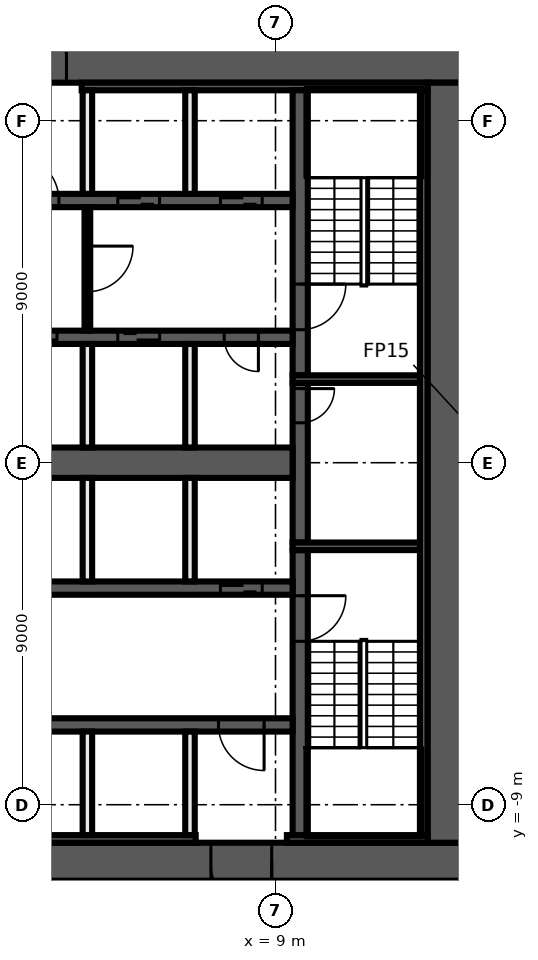
"""IFC4 building model, lengths in metres.
Left out: names, types, materials, properties, quantities, classifications, styles, units other than length and angle.
Written with IfcOpenShell. Run it as: python <this file> out.ifc"""

import sys

from ifc_helpers import new_model, si_unit, direction, frame, frame_2d, origin, place, context, subcontext, project, spatial, rectangle, extrude, element, fill, save


model = new_model("IFC4")
c1 = context("Model", 3, precision=1e-05, world=origin(), true_north=direction((0.0, 1.0)))
c2 = subcontext(c1, "Body", "Model", "MODEL_VIEW")
j1 = project(units=[si_unit("LENGTHUNIT", "METRE"), si_unit("PLANEANGLEUNIT", "RADIAN")], contexts=[c1])
p1 = place(None, origin())
s1 = spatial("IfcSite", under=j1, at=p1, CompositionType="ELEMENT")
p2 = place(p1, origin())
s2 = spatial("IfcBuilding", under=s1, at=p2, CompositionType="ELEMENT")
p3 = place(p2, frame((0.0, 0.0, 128.5)))
s3 = spatial("IfcBuildingStorey", under=s2, at=p3, CompositionType="ELEMENT", Elevation=128.5)
p4 = place(p3, frame((-14.0, 10.5, 0.0), z_axis=(0.0, 0.0, 1.0), x_axis=(1.0, 0.0, 0.0)))
e1 = element("IfcWall", 1, at=p4, inside=s3, PredefinedType="SHEAR", context=c2, shape_type="SweptSolid", body=[
    extrude(rectangle(XDim=28.0, YDim=1.0, at=frame_2d((14.0, 0.0))), origin(), (0.0, 0.0, 1.0), 3.3),
])
p5 = place(p4, frame((15.9, 0.0, 0.0)))
e2 = element("IfcOpeningElement", 2, at=p5, cuts=e1, PredefinedType="OPENING", context=c2, shape_type="SweptSolid", body=[
    extrude(rectangle(XDim=1.6, YDim=2.1, at=frame_2d((0.8, 1.05))), frame((0.0, 0.51, 0.0), z_axis=(0.0, -1.0, 0.0), x_axis=(1.0, 0.0, 0.0)), (0.0, 0.0, 1.0), 1.02),
])
p6 = place(p3, frame((14.0, -10.5, 0.0), z_axis=(0.0, 0.0, 1.0), x_axis=(-1.0, 0.0, 0.0)))
e3 = element("IfcWall", 3, at=p6, inside=s3, PredefinedType="SHEAR", context=c2, shape_type="SweptSolid", body=[
    extrude(rectangle(XDim=28.0, YDim=1.0, at=frame_2d((14.0, 0.0))), origin(), (0.0, 0.0, 1.0), 3.3),
])
p7 = place(p6, frame((5.1, 0.0, 0.0)))
e4 = element("IfcOpeningElement", 4, at=p7, cuts=e3, PredefinedType="OPENING", context=c2, shape_type="SweptSolid", body=[
    extrude(rectangle(XDim=1.6, YDim=2.1, at=frame_2d((0.8, 1.05))), frame((0.0, 0.51, 0.0), z_axis=(0.0, -1.0, 0.0), x_axis=(1.0, 0.0, 0.0)), (0.0, 0.0, 1.0), 1.02),
])
p8 = place(p3, frame((13.5, 10.0, 0.0), z_axis=(0.0, 0.0, 1.0), x_axis=(0.0, -1.0, 0.0)))
e5 = element("IfcWall", 5, at=p8, inside=s3, PredefinedType="SHEAR", context=c2, shape_type="SweptSolid", body=[
    extrude(rectangle(XDim=20.0, YDim=1.0, at=frame_2d((10.0, 0.0))), origin(), (0.0, 0.0, 1.0), 3.3),
])
p9 = place(p3, frame((3.9, 9.9, 0.0), z_axis=(0.0, 0.0, 1.0), x_axis=(1.0, 0.0, 0.0)))
e6 = element("IfcWall", 6, at=p9, inside=s3, PredefinedType="SHEAR", context=c2, shape_type="SweptSolid", body=[
    extrude(rectangle(XDim=9.1, YDim=0.2, at=frame_2d((4.55, 0.0))), origin(), (0.0, 0.0, 1.0), 3.3),
])
p10 = place(p3, frame((13.0, -9.9, 0.0), z_axis=(0.0, 0.0, 1.0), x_axis=(-1.0, 0.0, 0.0)))
e7 = element("IfcWall", 7, at=p10, inside=s3, PredefinedType="SHEAR", context=c2, shape_type="SweptSolid", body=[
    extrude(rectangle(XDim=3.7, YDim=0.2, at=frame_2d((1.85, 0.0))), origin(), (0.0, 0.0, 1.0), 3.3),
])
p11 = place(p3, frame((6.9, -9.9, 0.0), z_axis=(0.0, 0.0, 1.0), x_axis=(-1.0, 0.0, 0.0)))
e8 = element("IfcWall", 8, at=p11, inside=s3, PredefinedType="SHEAR", context=c2, shape_type="SweptSolid", body=[
    extrude(rectangle(XDim=19.9, YDim=0.2, at=frame_2d((9.95, 0.0))), origin(), (0.0, 0.0, 1.0), 3.3),
])
p12 = place(p3, frame((12.9, 9.8, 0.0), z_axis=(0.0, 0.0, 1.0), x_axis=(0.0, -1.0, 0.0)))
e9 = element("IfcWall", 9, at=p12, inside=s3, PredefinedType="SHEAR", context=c2, shape_type="SweptSolid", body=[
    extrude(rectangle(XDim=19.6, YDim=0.2, at=frame_2d((9.8, 0.0))), origin(), (0.0, 0.0, 1.0), 3.3),
])
p13 = place(p3, frame((9.65, -2.3, 0.0), z_axis=(0.0, 0.0, 1.0), x_axis=(0.0, -1.0, 0.0)))
e10 = element("IfcWall", 10, at=p13, inside=s3, PredefinedType="SHEAR", context=c2, shape_type="SweptSolid", body=[
    extrude(rectangle(XDim=7.5, YDim=0.4, at=frame_2d((3.75, 0.0))), origin(), (0.0, 0.0, 1.0), 3.3),
])
p14 = place(p13, frame((1.2, 0.0, 0.0)))
e11 = element("IfcOpeningElement", 11, at=p14, cuts=e10, PredefinedType="OPENING", context=c2, shape_type="SweptSolid", body=[
    extrude(rectangle(XDim=1.2, YDim=2.1, at=frame_2d((0.6, 1.05))), frame((0.0, 0.21, 0.0), z_axis=(0.0, -1.0, 0.0), x_axis=(1.0, 0.0, 0.0)), (0.0, 0.0, 1.0), 0.42),
])
p15 = place(p3, frame((9.65, 2.1, 0.0), z_axis=(0.0, 0.0, 1.0), x_axis=(0.0, -1.0, 0.0)))
e12 = element("IfcWall", 12, at=p15, inside=s3, PredefinedType="SHEAR", context=c2, shape_type="SweptSolid", body=[
    extrude(rectangle(XDim=4.2, YDim=0.4, at=frame_2d((2.1, 0.0))), origin(), (0.0, 0.0, 1.0), 3.3),
])
p16 = place(p15, frame((0.15, 0.0, 0.0)))
e13 = element("IfcOpeningElement", 13, at=p16, cuts=e12, PredefinedType="OPENING", context=c2, shape_type="SweptSolid", body=[
    extrude(rectangle(XDim=0.9, YDim=2.1, at=frame_2d((0.45, 1.05))), frame((0.0, 0.21, 0.0), z_axis=(0.0, -1.0, 0.0), x_axis=(1.0, 0.0, 0.0)), (0.0, 0.0, 1.0), 0.42),
])
p17 = place(p3, frame((9.65, 9.8, 0.0), z_axis=(0.0, 0.0, 1.0), x_axis=(0.0, -1.0, 0.0)))
e14 = element("IfcWall", 14, at=p17, inside=s3, PredefinedType="SHEAR", context=c2, shape_type="SweptSolid", body=[
    extrude(rectangle(XDim=7.5, YDim=0.4, at=frame_2d((3.75, 0.0))), origin(), (0.0, 0.0, 1.0), 3.3),
])
p18 = place(p17, frame((5.1, 0.0, 0.0)))
e15 = element("IfcOpeningElement", 15, at=p18, cuts=e14, PredefinedType="OPENING", context=c2, shape_type="SweptSolid", body=[
    extrude(rectangle(XDim=1.2, YDim=2.1, at=frame_2d((0.6, 1.05))), frame((0.0, 0.21, 0.0), z_axis=(0.0, -1.0, 0.0), x_axis=(1.0, 0.0, 0.0)), (0.0, 0.0, 1.0), 0.42),
])
for number, where, z_axis, x_axis in (
    (16, (9.45, 2.2, 0.0), (0.0, 0.0, 1.0), (1.0, 0.0, 0.0)),
    (17, (9.45, -2.2, 0.0), (0.0, 0.0, 1.0), (1.0, 0.0, 0.0)),
):
    element("IfcWall", number, at=place(p3, frame(where, z_axis=z_axis, x_axis=x_axis)), inside=s3, PredefinedType="SHEAR", context=c2, shape_type="SweptSolid", body=[
        extrude(rectangle(XDim=3.35, YDim=0.2, at=frame_2d((1.675, 0.0))), origin(), (0.0, 0.0, 1.0), 3.3),
    ])
p19 = place(p3, frame((-9.45, 6.9, 0.0), z_axis=(0.0, 0.0, 1.0), x_axis=(1.0, 0.0, 0.0)))
e18 = element("IfcWall", 18, at=p19, inside=s3, PredefinedType="SHEAR", context=c2, shape_type="SweptSolid", body=[
    extrude(rectangle(XDim=18.9, YDim=0.35, at=frame_2d((9.45, 0.0))), origin(), (0.0, 0.0, 1.0), 3.3),
])
p20 = place(p19, frame((0.8, 0.0, 0.0)))
e19 = element("IfcOpeningElement", 19, at=p20, cuts=e18, PredefinedType="OPENING", context=c2, shape_type="SweptSolid", body=[
    extrude(rectangle(XDim=1.1, YDim=2.1, at=frame_2d((0.55, 1.05))), frame((0.0, 0.185, 0.0), z_axis=(0.0, -1.0, 0.0), x_axis=(1.0, 0.0, 0.0)), (0.0, 0.0, 1.0), 0.37),
])
p21 = place(p19, frame((3.5, 0.0, 0.0)))
e20 = element("IfcOpeningElement", 20, at=p21, cuts=e18, PredefinedType="OPENING", context=c2, shape_type="SweptSolid", body=[
    extrude(rectangle(XDim=1.1, YDim=2.1, at=frame_2d((0.55, 1.05))), frame((0.0, 0.185, 0.0), z_axis=(0.0, -1.0, 0.0), x_axis=(1.0, 0.0, 0.0)), (0.0, 0.0, 1.0), 0.37),
])
p22 = place(p19, frame((6.2, 0.0, 0.0)))
e21 = element("IfcOpeningElement", 21, at=p22, cuts=e18, PredefinedType="OPENING", context=c2, shape_type="SweptSolid", body=[
    extrude(rectangle(XDim=1.1, YDim=2.1, at=frame_2d((0.55, 1.05))), frame((0.0, 0.185, 0.0), z_axis=(0.0, -1.0, 0.0), x_axis=(1.0, 0.0, 0.0)), (0.0, 0.0, 1.0), 0.37),
])
p23 = place(p19, frame((8.9, 0.0, 0.0)))
e22 = element("IfcOpeningElement", 22, at=p23, cuts=e18, PredefinedType="OPENING", context=c2, shape_type="SweptSolid", body=[
    extrude(rectangle(XDim=1.1, YDim=2.1, at=frame_2d((0.55, 1.05))), frame((0.0, 0.185, 0.0), z_axis=(0.0, -1.0, 0.0), x_axis=(1.0, 0.0, 0.0)), (0.0, 0.0, 1.0), 0.37),
])
p24 = place(p19, frame((11.55, 0.0, 0.0)))
e23 = element("IfcOpeningElement", 23, at=p24, cuts=e18, PredefinedType="OPENING", context=c2, shape_type="SweptSolid", body=[
    extrude(rectangle(XDim=1.2, YDim=2.1, at=frame_2d((0.6, 1.05))), frame((0.0, 0.185, 0.0), z_axis=(0.0, -1.0, 0.0), x_axis=(1.0, 0.0, 0.0)), (0.0, 0.0, 1.0), 0.37),
])
p25 = place(p19, frame((14.3, 0.0, 0.0)))
e24 = element("IfcOpeningElement", 24, at=p25, cuts=e18, PredefinedType="OPENING", context=c2, shape_type="SweptSolid", body=[
    extrude(rectangle(XDim=1.1, YDim=2.1, at=frame_2d((0.55, 1.05))), frame((0.0, 0.185, 0.0), z_axis=(0.0, -1.0, 0.0), x_axis=(1.0, 0.0, 0.0)), (0.0, 0.0, 1.0), 0.37),
])
p26 = place(p19, frame((17.0, 0.0, 0.0)))
e25 = element("IfcOpeningElement", 25, at=p26, cuts=e18, PredefinedType="OPENING", context=c2, shape_type="SweptSolid", body=[
    extrude(rectangle(XDim=1.1, YDim=2.1, at=frame_2d((0.55, 1.05))), frame((0.0, 0.185, 0.0), z_axis=(0.0, -1.0, 0.0), x_axis=(1.0, 0.0, 0.0)), (0.0, 0.0, 1.0), 0.37),
])
p27 = place(p3, frame((9.45, 3.3, 0.0), z_axis=(0.0, 0.0, 1.0), x_axis=(-1.0, 0.0, 0.0)))
e26 = element("IfcWall", 26, at=p27, inside=s3, PredefinedType="SHEAR", context=c2, shape_type="SweptSolid", body=[
    extrude(rectangle(XDim=18.9, YDim=0.35, at=frame_2d((9.45, 0.0))), origin(), (0.0, 0.0, 1.0), 3.3),
])
p28 = place(p27, frame((17.0, 0.0, 0.0)))
e27 = element("IfcOpeningElement", 27, at=p28, cuts=e26, PredefinedType="OPENING", context=c2, shape_type="SweptSolid", body=[
    extrude(rectangle(XDim=1.1, YDim=2.1, at=frame_2d((0.55, 1.05))), frame((0.0, 0.185, 0.0), z_axis=(0.0, -1.0, 0.0), x_axis=(1.0, 0.0, 0.0)), (0.0, 0.0, 1.0), 0.37),
])
p29 = place(p27, frame((14.3, 0.0, 0.0)))
e28 = element("IfcOpeningElement", 28, at=p29, cuts=e26, PredefinedType="OPENING", context=c2, shape_type="SweptSolid", body=[
    extrude(rectangle(XDim=1.1, YDim=2.1, at=frame_2d((0.55, 1.05))), frame((0.0, 0.185, 0.0), z_axis=(0.0, -1.0, 0.0), x_axis=(1.0, 0.0, 0.0)), (0.0, 0.0, 1.0), 0.37),
])
p30 = place(p27, frame((11.6, 0.0, 0.0)))
e29 = element("IfcOpeningElement", 29, at=p30, cuts=e26, PredefinedType="OPENING", context=c2, shape_type="SweptSolid", body=[
    extrude(rectangle(XDim=1.1, YDim=2.1, at=frame_2d((0.55, 1.05))), frame((0.0, 0.185, 0.0), z_axis=(0.0, -1.0, 0.0), x_axis=(1.0, 0.0, 0.0)), (0.0, 0.0, 1.0), 0.37),
])
p31 = place(p27, frame((8.9, 0.0, 0.0)))
e30 = element("IfcOpeningElement", 30, at=p31, cuts=e26, PredefinedType="OPENING", context=c2, shape_type="SweptSolid", body=[
    extrude(rectangle(XDim=1.1, YDim=2.1, at=frame_2d((0.55, 1.05))), frame((0.0, 0.185, 0.0), z_axis=(0.0, -1.0, 0.0), x_axis=(1.0, 0.0, 0.0)), (0.0, 0.0, 1.0), 0.37),
])
p32 = place(p27, frame((6.2, 0.0, 0.0)))
e31 = element("IfcOpeningElement", 31, at=p32, cuts=e26, PredefinedType="OPENING", context=c2, shape_type="SweptSolid", body=[
    extrude(rectangle(XDim=1.1, YDim=2.1, at=frame_2d((0.55, 1.05))), frame((0.0, 0.185, 0.0), z_axis=(0.0, -1.0, 0.0), x_axis=(1.0, 0.0, 0.0)), (0.0, 0.0, 1.0), 0.37),
])
p33 = place(p27, frame((3.5, 0.0, 0.0)))
e32 = element("IfcOpeningElement", 32, at=p33, cuts=e26, PredefinedType="OPENING", context=c2, shape_type="SweptSolid", body=[
    extrude(rectangle(XDim=1.1, YDim=2.1, at=frame_2d((0.55, 1.05))), frame((0.0, 0.185, 0.0), z_axis=(0.0, -1.0, 0.0), x_axis=(1.0, 0.0, 0.0)), (0.0, 0.0, 1.0), 0.37),
])
p34 = place(p27, frame((0.9, 0.0, 0.0)))
e33 = element("IfcOpeningElement", 33, at=p34, cuts=e26, PredefinedType="OPENING", context=c2, shape_type="SweptSolid", body=[
    extrude(rectangle(XDim=0.9, YDim=2.1, at=frame_2d((0.45, 1.05))), frame((0.0, 0.185, 0.0), z_axis=(0.0, -1.0, 0.0), x_axis=(1.0, 0.0, 0.0)), (0.0, 0.0, 1.0), 0.37),
])
p35 = place(p3, frame((-9.45, -3.3, 0.0), z_axis=(0.0, 0.0, 1.0), x_axis=(1.0, 0.0, 0.0)))
e34 = element("IfcWall", 34, at=p35, inside=s3, PredefinedType="SHEAR", context=c2, shape_type="SweptSolid", body=[
    extrude(rectangle(XDim=18.9, YDim=0.35, at=frame_2d((9.45, 0.0))), origin(), (0.0, 0.0, 1.0), 3.3),
])
p36 = place(p35, frame((17.0, 0.0, 0.0)))
e35 = element("IfcOpeningElement", 35, at=p36, cuts=e34, PredefinedType="OPENING", context=c2, shape_type="SweptSolid", body=[
    extrude(rectangle(XDim=1.1, YDim=2.1, at=frame_2d((0.55, 1.05))), frame((0.0, 0.185, 0.0), z_axis=(0.0, -1.0, 0.0), x_axis=(1.0, 0.0, 0.0)), (0.0, 0.0, 1.0), 0.37),
])
p37 = place(p35, frame((0.9, 0.0, 0.0)))
e36 = element("IfcOpeningElement", 36, at=p37, cuts=e34, PredefinedType="OPENING", context=c2, shape_type="SweptSolid", body=[
    extrude(rectangle(XDim=0.9, YDim=2.1, at=frame_2d((0.45, 1.05))), frame((0.0, 0.185, 0.0), z_axis=(0.0, -1.0, 0.0), x_axis=(1.0, 0.0, 0.0)), (0.0, 0.0, 1.0), 0.37),
])
p38 = place(p35, frame((3.6, 0.0, 0.0)))
e37 = element("IfcOpeningElement", 37, at=p38, cuts=e34, PredefinedType="OPENING", context=c2, shape_type="SweptSolid", body=[
    extrude(rectangle(XDim=0.9, YDim=2.1, at=frame_2d((0.45, 1.05))), frame((0.0, 0.185, 0.0), z_axis=(0.0, -1.0, 0.0), x_axis=(1.0, 0.0, 0.0)), (0.0, 0.0, 1.0), 0.37),
])
p39 = place(p35, frame((6.3, 0.0, 0.0)))
e38 = element("IfcOpeningElement", 38, at=p39, cuts=e34, PredefinedType="OPENING", context=c2, shape_type="SweptSolid", body=[
    extrude(rectangle(XDim=0.9, YDim=2.1, at=frame_2d((0.45, 1.05))), frame((0.0, 0.185, 0.0), z_axis=(0.0, -1.0, 0.0), x_axis=(1.0, 0.0, 0.0)), (0.0, 0.0, 1.0), 0.37),
])
p40 = place(p35, frame((9.0, 0.0, 0.0)))
e39 = element("IfcOpeningElement", 39, at=p40, cuts=e34, PredefinedType="OPENING", context=c2, shape_type="SweptSolid", body=[
    extrude(rectangle(XDim=0.9, YDim=2.1, at=frame_2d((0.45, 1.05))), frame((0.0, 0.185, 0.0), z_axis=(0.0, -1.0, 0.0), x_axis=(1.0, 0.0, 0.0)), (0.0, 0.0, 1.0), 0.37),
])
p41 = place(p3, frame((9.45, -6.9, 0.0), z_axis=(0.0, 0.0, 1.0), x_axis=(-1.0, 0.0, 0.0)))
e40 = element("IfcWall", 40, at=p41, inside=s3, PredefinedType="SHEAR", context=c2, shape_type="SweptSolid", body=[
    extrude(rectangle(XDim=18.9, YDim=0.35, at=frame_2d((9.45, 0.0))), origin(), (0.0, 0.0, 1.0), 3.3),
])
p42 = place(p41, frame((0.75, 0.0, 0.0)))
e41 = element("IfcOpeningElement", 41, at=p42, cuts=e40, PredefinedType="OPENING", context=c2, shape_type="SweptSolid", body=[
    extrude(rectangle(XDim=1.2, YDim=2.1, at=frame_2d((0.6, 1.05))), frame((0.0, 0.185, 0.0), z_axis=(0.0, -1.0, 0.0), x_axis=(1.0, 0.0, 0.0)), (0.0, 0.0, 1.0), 0.37),
])
p43 = place(p41, frame((17.1, 0.0, 0.0)))
e42 = element("IfcOpeningElement", 42, at=p43, cuts=e40, PredefinedType="OPENING", context=c2, shape_type="SweptSolid", body=[
    extrude(rectangle(XDim=0.9, YDim=2.1, at=frame_2d((0.45, 1.05))), frame((0.0, 0.185, 0.0), z_axis=(0.0, -1.0, 0.0), x_axis=(1.0, 0.0, 0.0)), (0.0, 0.0, 1.0), 0.37),
])
p44 = place(p41, frame((13.05, 0.0, 0.0)))
e43 = element("IfcOpeningElement", 43, at=p44, cuts=e40, PredefinedType="OPENING", context=c2, shape_type="SweptSolid", body=[
    extrude(rectangle(XDim=0.9, YDim=2.1, at=frame_2d((0.45, 1.05))), frame((0.0, 0.185, 0.0), z_axis=(0.0, -1.0, 0.0), x_axis=(1.0, 0.0, 0.0)), (0.0, 0.0, 1.0), 0.37),
])
p45 = place(p41, frame((9.0, 0.0, 0.0)))
e44 = element("IfcOpeningElement", 44, at=p45, cuts=e40, PredefinedType="OPENING", context=c2, shape_type="SweptSolid", body=[
    extrude(rectangle(XDim=0.9, YDim=2.1, at=frame_2d((0.45, 1.05))), frame((0.0, 0.185, 0.0), z_axis=(0.0, -1.0, 0.0), x_axis=(1.0, 0.0, 0.0)), (0.0, 0.0, 1.0), 0.37),
])
p46 = place(p3, frame((-9.45, 0.0, 0.0), z_axis=(0.0, 0.0, 1.0), x_axis=(1.0, 0.0, 0.0)))
e45 = element("IfcWall", 45, at=p46, inside=s3, PredefinedType="SHEAR", context=c2, shape_type="SweptSolid", body=[
    extrude(rectangle(XDim=18.9, YDim=0.8, at=frame_2d((9.45, 0.0))), origin(), (0.0, 0.0, 1.0), 3.3),
])
for number, where, z_axis, x_axis in (
    (46, (6.75, -9.8, 0.0), (0.0, 0.0, 1.0), (0.0, 1.0, 0.0)),
    (47, (6.75, -3.125, 0.0), (0.0, 0.0, 1.0), (0.0, 1.0, 0.0)),
    (48, (6.75, 0.4, 0.0), (0.0, 0.0, 1.0), (0.0, 1.0, 0.0)),
    (49, (6.75, 7.075, 0.0), (0.0, 0.0, 1.0), (0.0, 1.0, 0.0)),
):
    element("IfcWall", number, at=place(p3, frame(where, z_axis=z_axis, x_axis=x_axis)), inside=s3, PredefinedType="SOLIDWALL", context=c2, shape_type="SweptSolid", body=[
        extrude(rectangle(XDim=2.725, YDim=0.25, at=frame_2d((1.363, 0.0))), origin(), (0.0, 0.0, 1.0), 3.3),
    ])
p47 = place(p3, frame((4.05, 6.725, 0.0), z_axis=(0.0, 0.0, 1.0), x_axis=(0.0, -1.0, 0.0)))
e50 = element("IfcWall", 50, at=p47, inside=s3, PredefinedType="PARTITIONING", context=c2, shape_type="SweptSolid", body=[
    extrude(rectangle(XDim=3.25, YDim=0.15, at=frame_2d((1.625, 0.0))), origin(), (0.0, 0.0, 1.0), 3.3),
])
p48 = place(p47, frame((1.025, 0.0, 0.0)))
e51 = element("IfcOpeningElement", 51, at=p48, cuts=e50, PredefinedType="OPENING", context=c2, shape_type="SweptSolid", body=[
    extrude(rectangle(XDim=1.2, YDim=2.1, at=frame_2d((0.6, 1.05))), frame((0.0, 0.085, 0.0), z_axis=(0.0, -1.0, 0.0), x_axis=(1.0, 0.0, 0.0)), (0.0, 0.0, 1.0), 0.17),
])
for number, where, z_axis, x_axis in (
    (52, (4.05, -9.8, 0.0), (0.0, 0.0, 1.0), (0.0, 1.0, 0.0)),
    (53, (4.05, -3.125, 0.0), (0.0, 0.0, 1.0), (0.0, 1.0, 0.0)),
    (54, (4.05, 0.4, 0.0), (0.0, 0.0, 1.0), (0.0, 1.0, 0.0)),
    (55, (4.05, 7.075, 0.0), (0.0, 0.0, 1.0), (0.0, 1.0, 0.0)),
):
    element("IfcWall", number, at=place(p3, frame(where, z_axis=z_axis, x_axis=x_axis)), inside=s3, PredefinedType="SOLIDWALL", context=c2, shape_type="SweptSolid", body=[
        extrude(rectangle(XDim=2.725, YDim=0.25, at=frame_2d((1.363, 0.0))), origin(), (0.0, 0.0, 1.0), 3.3),
    ])
p49 = place(p16, origin())
e56 = element("IfcDoor", 56, at=p49, inside=s3, OperationType="SINGLE_SWING_RIGHT", PredefinedType="DOOR", context=c2, shape_type="SweptSolid", body=[
    extrude(rectangle(XDim=0.9, YDim=2.1, at=frame_2d((0.45, 1.05))), frame((0.0, 0.025, 0.0), z_axis=(0.0, -1.0, 0.0), x_axis=(1.0, 0.0, 0.0)), (0.0, 0.0, 1.0), 0.05),
])
fill(e13, e56)
p50 = place(p5, origin())
e57 = element("IfcDoor", 57, at=p50, inside=s3, OperationType="DOUBLE_DOOR_SINGLE_SWING", PredefinedType="DOOR", context=c2, shape_type="SweptSolid", body=[
    extrude(rectangle(XDim=1.6, YDim=2.1, at=frame_2d((0.8, 1.05))), frame((0.0, 0.025, 0.0), z_axis=(0.0, -1.0, 0.0), x_axis=(1.0, 0.0, 0.0)), (0.0, 0.0, 1.0), 0.05),
])
fill(e2, e57)
p51 = place(p24, origin())
e58 = element("IfcDoor", 58, at=p51, inside=s3, OperationType="SINGLE_SWING_LEFT", PredefinedType="DOOR", context=c2, shape_type="SweptSolid", body=[
    extrude(rectangle(XDim=1.2, YDim=2.1, at=frame_2d((0.6, 1.05))), frame((0.0, 0.025, 0.0), z_axis=(0.0, -1.0, 0.0), x_axis=(1.0, 0.0, 0.0)), (0.0, 0.0, 1.0), 0.05),
])
fill(e23, e58)
p52 = place(p25, origin())
e59 = element("IfcDoor", 59, at=p52, inside=s3, OperationType="DOUBLE_DOOR_SLIDING", PredefinedType="DOOR", context=c2, shape_type="SweptSolid", body=[
    extrude(rectangle(XDim=1.1, YDim=2.1, at=frame_2d((0.55, 1.05))), frame((0.0, 0.025, 0.0), z_axis=(0.0, -1.0, 0.0), x_axis=(1.0, 0.0, 0.0)), (0.0, 0.0, 1.0), 0.05),
])
fill(e24, e59)
p53 = place(p26, origin())
e60 = element("IfcDoor", 60, at=p53, inside=s3, OperationType="DOUBLE_DOOR_SLIDING", PredefinedType="DOOR", context=c2, shape_type="SweptSolid", body=[
    extrude(rectangle(XDim=1.1, YDim=2.1, at=frame_2d((0.55, 1.05))), frame((0.0, 0.025, 0.0), z_axis=(0.0, -1.0, 0.0), x_axis=(1.0, 0.0, 0.0)), (0.0, 0.0, 1.0), 0.05),
])
fill(e25, e60)
p54 = place(p32, origin())
e61 = element("IfcDoor", 61, at=p54, inside=s3, OperationType="DOUBLE_DOOR_SLIDING", PredefinedType="DOOR", context=c2, shape_type="SweptSolid", body=[
    extrude(rectangle(XDim=1.1, YDim=2.1, at=frame_2d((0.55, 1.05))), frame((0.0, 0.025, 0.0), z_axis=(0.0, -1.0, 0.0), x_axis=(1.0, 0.0, 0.0)), (0.0, 0.0, 1.0), 0.05),
])
fill(e31, e61)
p55 = place(p33, origin())
e62 = element("IfcDoor", 62, at=p55, inside=s3, OperationType="DOUBLE_DOOR_SLIDING", PredefinedType="DOOR", context=c2, shape_type="SweptSolid", body=[
    extrude(rectangle(XDim=1.1, YDim=2.1, at=frame_2d((0.55, 1.05))), frame((0.0, 0.025, 0.0), z_axis=(0.0, -1.0, 0.0), x_axis=(1.0, 0.0, 0.0)), (0.0, 0.0, 1.0), 0.05),
])
fill(e32, e62)
p56 = place(p34, origin())
e63 = element("IfcDoor", 63, at=p56, inside=s3, OperationType="SINGLE_SWING_LEFT", PredefinedType="DOOR", context=c2, shape_type="SweptSolid", body=[
    extrude(rectangle(XDim=0.9, YDim=2.1, at=frame_2d((0.45, 1.05))), frame((0.0, 0.025, 0.0), z_axis=(0.0, -1.0, 0.0), x_axis=(1.0, 0.0, 0.0)), (0.0, 0.0, 1.0), 0.05),
])
fill(e33, e63)
p57 = place(p36, origin())
e64 = element("IfcDoor", 64, at=p57, inside=s3, OperationType="DOUBLE_DOOR_SLIDING", PredefinedType="DOOR", context=c2, shape_type="SweptSolid", body=[
    extrude(rectangle(XDim=1.1, YDim=2.1, at=frame_2d((0.55, 1.05))), frame((0.0, 0.025, 0.0), z_axis=(0.0, -1.0, 0.0), x_axis=(1.0, 0.0, 0.0)), (0.0, 0.0, 1.0), 0.05),
])
fill(e35, e64)
p58 = place(p7, origin())
e65 = element("IfcDoor", 65, at=p58, inside=s3, OperationType="DOUBLE_DOOR_SINGLE_SWING", PredefinedType="DOOR", context=c2, shape_type="SweptSolid", body=[
    extrude(rectangle(XDim=1.6, YDim=2.1, at=frame_2d((0.8, 1.05))), frame((0.0, 0.025, 0.0), z_axis=(0.0, -1.0, 0.0), x_axis=(1.0, 0.0, 0.0)), (0.0, 0.0, 1.0), 0.05),
])
fill(e4, e65)
p59 = place(p42, origin())
e66 = element("IfcDoor", 66, at=p59, inside=s3, OperationType="SINGLE_SWING_LEFT", PredefinedType="DOOR", context=c2, shape_type="SweptSolid", body=[
    extrude(rectangle(XDim=1.2, YDim=2.1, at=frame_2d((0.6, 1.05))), frame((0.0, 0.025, 0.0), z_axis=(0.0, -1.0, 0.0), x_axis=(1.0, 0.0, 0.0)), (0.0, 0.0, 1.0), 0.05),
])
fill(e41, e66)
p60 = place(p18, origin())
e67 = element("IfcDoor", 67, at=p60, inside=s3, OperationType="SINGLE_SWING_LEFT", PredefinedType="DOOR", context=c2, shape_type="SweptSolid", body=[
    extrude(rectangle(XDim=1.2, YDim=2.1, at=frame_2d((0.6, 1.05))), frame((0.0, 0.025, 0.0), z_axis=(0.0, -1.0, 0.0), x_axis=(1.0, 0.0, 0.0)), (0.0, 0.0, 1.0), 0.05),
])
fill(e15, e67)
p61 = place(p14, origin())
e68 = element("IfcDoor", 68, at=p61, inside=s3, OperationType="SINGLE_SWING_RIGHT", PredefinedType="DOOR", context=c2, shape_type="SweptSolid", body=[
    extrude(rectangle(XDim=1.2, YDim=2.1, at=frame_2d((0.6, 1.05))), frame((0.0, 0.025, 0.0), z_axis=(0.0, -1.0, 0.0), x_axis=(1.0, 0.0, 0.0)), (0.0, 0.0, 1.0), 0.05),
])
fill(e11, e68)
p62 = place(p48, origin())
e69 = element("IfcDoor", 69, at=p62, inside=s3, OperationType="SINGLE_SWING_RIGHT", PredefinedType="DOOR", context=c2, shape_type="SweptSolid", body=[
    extrude(rectangle(XDim=1.2, YDim=2.1, at=frame_2d((0.6, 1.05))), frame((0.0, 0.025, 0.0), z_axis=(0.0, -1.0, 0.0), x_axis=(1.0, 0.0, 0.0)), (0.0, 0.0, 1.0), 0.05),
])
fill(e51, e69)
save(model, sys.argv[1])
